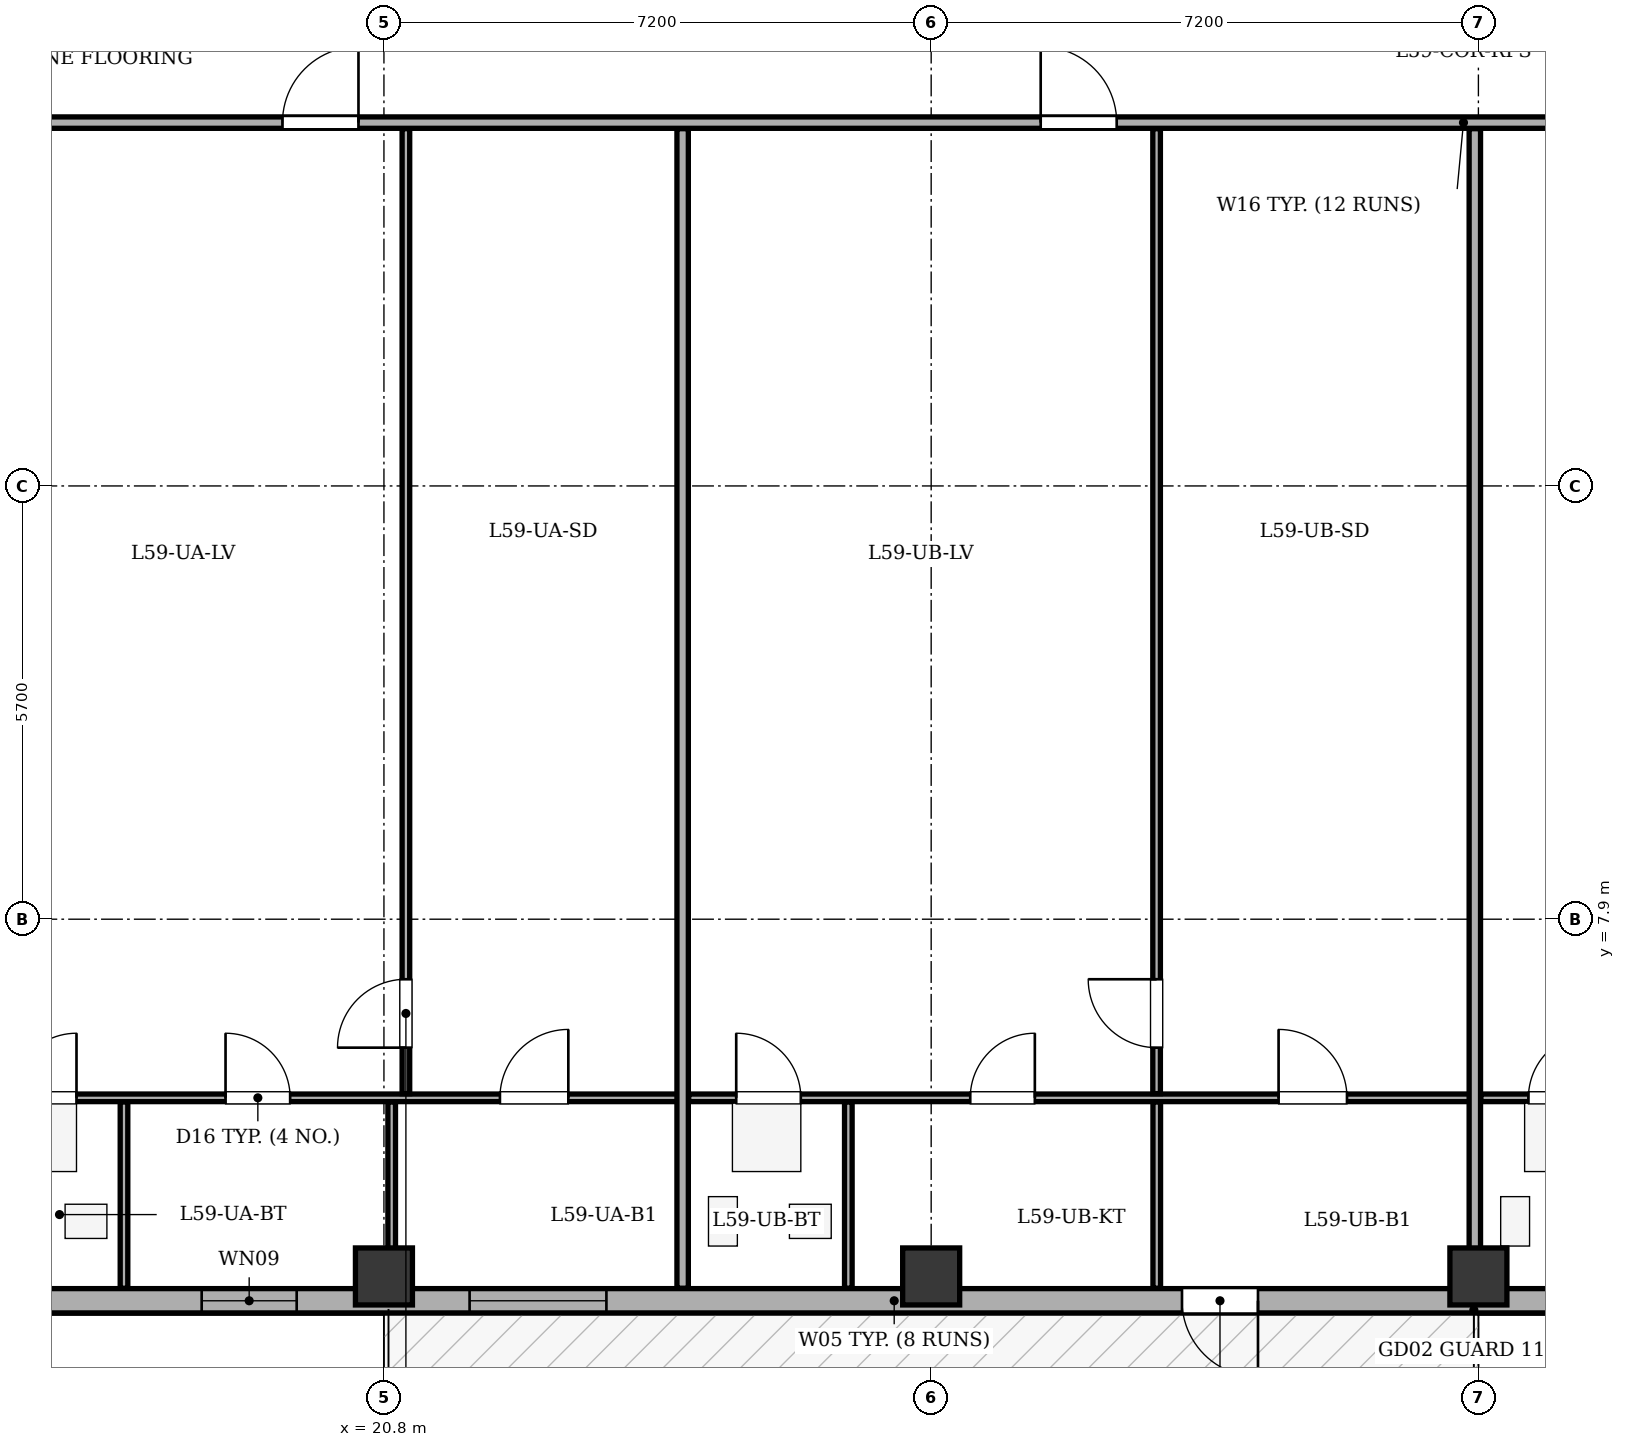
"""IFC4 building model, lengths in metres.
Left out: names, types, materials, properties, quantities, classifications, styles, units other than length and angle.
Written with IfcOpenShell. Run it as: python <this file> out.ifc"""

import sys

from ifc_helpers import new_model, si_unit, direction, frame, frame_2d, origin, origin_2d, place, context, subcontext, project, spatial, rectangle, extrude, element, fill, save


model = new_model("IFC4")
c1 = context("Model", 3, precision=1e-05, world=origin(), true_north=direction((0.0, 1.0)))
c2 = subcontext(c1, "Body", "Model", "MODEL_VIEW")
j1 = project(units=[si_unit("LENGTHUNIT", "METRE"), si_unit("PLANEANGLEUNIT", "RADIAN")], contexts=[c1])
p1 = place(None, origin())
s1 = spatial("IfcSite", under=j1, at=p1, CompositionType="ELEMENT")
p2 = place(p1, origin())
s2 = spatial("IfcBuilding", under=s1, at=p2, CompositionType="ELEMENT")
p3 = place(p2, frame((0.0, 0.0, 227.9)))
s3 = spatial("IfcBuildingStorey", under=s2, at=p3, CompositionType="ELEMENT", Elevation=227.9)
for number, where, z_axis, x_axis in (
    (1, (20.8, 3.2, 0.0), (0.0, 0.0, 1.0), (1.0, 0.0, 0.0)),
    (2, (28.0, 3.2, 0.0), (0.0, 0.0, 1.0), (1.0, 0.0, 0.0)),
    (3, (35.2, 3.2, 0.0), (0.0, 0.0, 1.0), (1.0, 0.0, 0.0)),
):
    element("IfcColumn", number, at=place(p3, frame(where, z_axis=z_axis, x_axis=x_axis)), inside=s3, PredefinedType="COLUMN", context=c2, shape_type="SweptSolid", body=[
        extrude(rectangle(XDim=0.75, YDim=0.75, at=origin_2d()), origin(), (0.0, 0.0, 1.0), 3.4),
    ])
p4 = place(p3, frame((51.2, 2.88, 0.0), z_axis=(0.0, 0.0, 1.0), x_axis=(-1.0, 0.0, 0.0)))
e4 = element("IfcWall", 4, at=p4, inside=s3, PredefinedType="STANDARD", context=c2, shape_type="SweptSolid", body=[
    extrude(rectangle(XDim=36.0, YDim=0.32, at=frame_2d((18.0, 0.0))), origin(), (0.0, 0.0, 1.0), 2.725),
])
p5 = place(p4, frame((18.9, 0.0, 0.0)))
e5 = element("IfcOpeningElement", 5, at=p5, cuts=e4, PredefinedType="OPENING", context=c2, shape_type="SweptSolid", body=[
    extrude(rectangle(XDim=1.0, YDim=2.02, at=frame_2d((0.5, 1.01))), frame((0.0, 0.17, 0.0), z_axis=(0.0, -1.0, 0.0), x_axis=(1.0, 0.0, 0.0)), (0.0, 0.0, 1.0), 0.34),
])
p6 = place(p4, frame((2.31, 0.0, 0.75)))
e6 = element("IfcOpeningElement", 6, at=p6, cuts=e4, PredefinedType="OPENING", context=c2, shape_type="SweptSolid", body=[
    extrude(rectangle(XDim=1.8, YDim=1.7, at=frame_2d((0.9, 0.85))), frame((0.0, 0.17, 0.0), z_axis=(0.0, -1.0, 0.0), x_axis=(1.0, 0.0, 0.0)), (0.0, 0.0, 1.0), 0.34),
])
p7 = place(p4, frame((7.294, 0.0, 0.75)))
e7 = element("IfcOpeningElement", 7, at=p7, cuts=e4, PredefinedType="OPENING", context=c2, shape_type="SweptSolid", body=[
    extrude(rectangle(XDim=1.8, YDim=1.7, at=frame_2d((0.9, 0.85))), frame((0.0, 0.17, 0.0), z_axis=(0.0, -1.0, 0.0), x_axis=(1.0, 0.0, 0.0)), (0.0, 0.0, 1.0), 0.34),
])
p8 = place(p4, frame((11.117, 0.0, 0.75)))
e8 = element("IfcOpeningElement", 8, at=p8, cuts=e4, PredefinedType="OPENING", context=c2, shape_type="SweptSolid", body=[
    extrude(rectangle(XDim=1.8, YDim=1.7, at=frame_2d((0.9, 0.85))), frame((0.0, 0.17, 0.0), z_axis=(0.0, -1.0, 0.0), x_axis=(1.0, 0.0, 0.0)), (0.0, 0.0, 1.0), 0.34),
])
p9 = place(p4, frame((27.473, 0.0, 0.75)))
e9 = element("IfcOpeningElement", 9, at=p9, cuts=e4, PredefinedType="OPENING", context=c2, shape_type="SweptSolid", body=[
    extrude(rectangle(XDim=1.8, YDim=1.7, at=frame_2d((0.9, 0.85))), frame((0.0, 0.17, 0.0), z_axis=(0.0, -1.0, 0.0), x_axis=(1.0, 0.0, 0.0)), (0.0, 0.0, 1.0), 0.34),
])
p10 = place(p4, frame((31.548, 0.0, 0.75)))
e10 = element("IfcOpeningElement", 10, at=p10, cuts=e4, PredefinedType="OPENING", context=c2, shape_type="SweptSolid", body=[
    extrude(rectangle(XDim=1.25, YDim=1.7, at=frame_2d((0.625, 0.85))), frame((0.0, 0.17, 0.0), z_axis=(0.0, -1.0, 0.0), x_axis=(1.0, 0.0, 0.0)), (0.0, 0.0, 1.0), 0.34),
])
p11 = place(p3, frame((15.08, 18.38, 0.0), z_axis=(0.0, 0.0, 1.0), x_axis=(1.0, 0.0, 0.0)))
e11 = element("IfcWall", 11, at=p11, inside=s3, PredefinedType="PARTITIONING", context=c2, shape_type="SweptSolid", body=[
    extrude(rectangle(XDim=30.02, YDim=0.15, at=frame_2d((15.01, 0.0))), origin(), (0.0, 0.0, 1.0), 3.1),
])
p12 = place(p11, frame((4.385, 0.0, 0.0)))
e12 = element("IfcOpeningElement", 12, at=p12, cuts=e11, PredefinedType="OPENING", context=c2, shape_type="SweptSolid", body=[
    extrude(rectangle(XDim=1.0, YDim=2.1, at=frame_2d((0.5, 1.05))), frame((0.0, 0.085, 0.0), z_axis=(0.0, -1.0, 0.0), x_axis=(1.0, 0.0, 0.0)), (0.0, 0.0, 1.0), 0.17),
])
p13 = place(p11, frame((14.361, 0.0, 0.0)))
e13 = element("IfcOpeningElement", 13, at=p13, cuts=e11, PredefinedType="OPENING", context=c2, shape_type="SweptSolid", body=[
    extrude(rectangle(XDim=1.0, YDim=2.1, at=frame_2d((0.5, 1.05))), frame((0.0, 0.085, 0.0), z_axis=(0.0, -1.0, 0.0), x_axis=(1.0, 0.0, 0.0)), (0.0, 0.0, 1.0), 0.17),
])
p14 = place(p11, frame((24.486, 0.0, 0.0)))
e14 = element("IfcOpeningElement", 14, at=p14, cuts=e11, PredefinedType="OPENING", context=c2, shape_type="SweptSolid", body=[
    extrude(rectangle(XDim=1.0, YDim=2.1, at=frame_2d((0.5, 1.05))), frame((0.0, 0.085, 0.0), z_axis=(0.0, -1.0, 0.0), x_axis=(1.0, 0.0, 0.0)), (0.0, 0.0, 1.0), 0.17),
])
p15 = place(p3, frame((15.28, 5.55, 0.0), z_axis=(0.0, 0.0, 1.0), x_axis=(1.0, 0.0, 0.0)))
e15 = element("IfcWall", 15, at=p15, inside=s3, PredefinedType="PARTITIONING", context=c2, shape_type="SweptSolid", body=[
    extrude(rectangle(XDim=9.49, YDim=0.1, at=frame_2d((4.745, 0.0))), origin(), (0.0, 0.0, 1.0), 3.1),
])
p16 = place(p15, frame((0.625, 0.0, 0.0)))
e16 = element("IfcOpeningElement", 16, at=p16, cuts=e15, PredefinedType="OPENING", context=c2, shape_type="SweptSolid", body=[
    extrude(rectangle(XDim=0.85, YDim=2.05, at=frame_2d((0.425, 1.025))), frame((0.0, 0.06, 0.0), z_axis=(0.0, -1.0, 0.0), x_axis=(1.0, 0.0, 0.0)), (0.0, 0.0, 1.0), 0.12),
])
p17 = place(p15, frame((3.436, 0.0, 0.0)))
e17 = element("IfcOpeningElement", 17, at=p17, cuts=e15, PredefinedType="OPENING", context=c2, shape_type="SweptSolid", body=[
    extrude(rectangle(XDim=0.85, YDim=2.05, at=frame_2d((0.425, 1.025))), frame((0.0, 0.06, 0.0), z_axis=(0.0, -1.0, 0.0), x_axis=(1.0, 0.0, 0.0)), (0.0, 0.0, 1.0), 0.12),
])
p18 = place(p15, frame((7.046, 0.0, 0.0)))
e18 = element("IfcOpeningElement", 18, at=p18, cuts=e15, PredefinedType="OPENING", context=c2, shape_type="SweptSolid", body=[
    extrude(rectangle(XDim=0.9, YDim=2.05, at=frame_2d((0.45, 1.025))), frame((0.0, 0.06, 0.0), z_axis=(0.0, -1.0, 0.0), x_axis=(1.0, 0.0, 0.0)), (0.0, 0.0, 1.0), 0.12),
])
p19 = place(p3, frame((21.089, 5.605, 0.0), z_axis=(0.0, 0.0, 1.0), x_axis=(0.0, 1.0, 0.0)))
e19 = element("IfcWall", 19, at=p19, inside=s3, PredefinedType="PARTITIONING", context=c2, shape_type="SweptSolid", body=[
    extrude(rectangle(XDim=12.695, YDim=0.1, at=frame_2d((6.348, 0.0))), origin(), (0.0, 0.0, 1.0), 2.535),
])
p20 = place(p19, frame((0.605, 0.0, 0.0)))
e20 = element("IfcOpeningElement", 20, at=p20, cuts=e19, PredefinedType="OPENING", context=c2, shape_type="SweptSolid", body=[
    extrude(rectangle(XDim=0.9, YDim=2.05, at=frame_2d((0.45, 1.025))), frame((0.0, 0.06, 0.0), z_axis=(0.0, -1.0, 0.0), x_axis=(1.0, 0.0, 0.0)), (0.0, 0.0, 1.0), 0.12),
])
p21 = place(p3, frame((17.38, 3.045, 0.0), z_axis=(0.0, 0.0, 1.0), x_axis=(0.0, 1.0, 0.0)))
e21 = element("IfcWall", 21, at=p21, inside=s3, PredefinedType="PARTITIONING", context=c2, shape_type="SweptSolid", body=[
    extrude(rectangle(XDim=2.45, YDim=0.1, at=frame_2d((1.225, 0.0))), origin(), (0.0, 0.0, 1.0), 3.1),
])
p22 = place(p3, frame((20.902, 3.045, 0.0), z_axis=(0.0, 0.0, 1.0), x_axis=(0.0, 1.0, 0.0)))
e22 = element("IfcWall", 22, at=p22, inside=s3, PredefinedType="PARTITIONING", context=c2, shape_type="SweptSolid", body=[
    extrude(rectangle(XDim=2.45, YDim=0.1, at=frame_2d((1.225, 0.0))), origin(), (0.0, 0.0, 1.0), 2.535),
])
p23 = place(p3, frame((24.73, 3.045, 0.0), z_axis=(0.0, 0.0, 1.0), x_axis=(0.0, 1.0, 0.0)))
e23 = element("IfcWall", 23, at=p23, inside=s3, PredefinedType="PARTITIONING", context=c2, shape_type="SweptSolid", body=[
    extrude(rectangle(XDim=15.255, YDim=0.15, at=frame_2d((7.627, 0.0))), origin(), (0.0, 0.0, 1.0), 3.1),
])
p24 = place(p3, frame((24.81, 5.55, 0.0), z_axis=(0.0, 0.0, 1.0), x_axis=(1.0, 0.0, 0.0)))
e24 = element("IfcWall", 24, at=p24, inside=s3, PredefinedType="PARTITIONING", context=c2, shape_type="SweptSolid", body=[
    extrude(rectangle(XDim=10.383, YDim=0.1, at=frame_2d((5.191, 0.0))), origin(), (0.0, 0.0, 1.0), 3.1),
])
p25 = place(p24, frame((0.625, 0.0, 0.0)))
e25 = element("IfcOpeningElement", 25, at=p25, cuts=e24, PredefinedType="OPENING", context=c2, shape_type="SweptSolid", body=[
    extrude(rectangle(XDim=0.85, YDim=2.05, at=frame_2d((0.425, 1.025))), frame((0.0, 0.06, 0.0), z_axis=(0.0, -1.0, 0.0), x_axis=(1.0, 0.0, 0.0)), (0.0, 0.0, 1.0), 0.12),
])
p26 = place(p24, frame((3.704, 0.0, 0.0)))
e26 = element("IfcOpeningElement", 26, at=p26, cuts=e24, PredefinedType="OPENING", context=c2, shape_type="SweptSolid", body=[
    extrude(rectangle(XDim=0.85, YDim=2.05, at=frame_2d((0.425, 1.025))), frame((0.0, 0.06, 0.0), z_axis=(0.0, -1.0, 0.0), x_axis=(1.0, 0.0, 0.0)), (0.0, 0.0, 1.0), 0.12),
])
p27 = place(p24, frame((7.761, 0.0, 0.0)))
e27 = element("IfcOpeningElement", 27, at=p27, cuts=e24, PredefinedType="OPENING", context=c2, shape_type="SweptSolid", body=[
    extrude(rectangle(XDim=0.9, YDim=2.05, at=frame_2d((0.45, 1.025))), frame((0.0, 0.06, 0.0), z_axis=(0.0, -1.0, 0.0), x_axis=(1.0, 0.0, 0.0)), (0.0, 0.0, 1.0), 0.12),
])
p28 = place(p3, frame((30.966, 5.605, 0.0), z_axis=(0.0, 0.0, 1.0), x_axis=(0.0, 1.0, 0.0)))
e28 = element("IfcWall", 28, at=p28, inside=s3, PredefinedType="PARTITIONING", context=c2, shape_type="SweptSolid", body=[
    extrude(rectangle(XDim=12.695, YDim=0.1, at=frame_2d((6.348, 0.0))), origin(), (0.0, 0.0, 1.0), 3.1),
])
p29 = place(p28, frame((0.605, 0.0, 0.0)))
e29 = element("IfcOpeningElement", 29, at=p29, cuts=e28, PredefinedType="OPENING", context=c2, shape_type="SweptSolid", body=[
    extrude(rectangle(XDim=0.9, YDim=2.05, at=frame_2d((0.45, 1.025))), frame((0.0, 0.06, 0.0), z_axis=(0.0, -1.0, 0.0), x_axis=(1.0, 0.0, 0.0)), (0.0, 0.0, 1.0), 0.12),
])
for number, where, z_axis, x_axis in (
    (30, (26.91, 3.045, 0.0), (0.0, 0.0, 1.0), (0.0, 1.0, 0.0)),
    (31, (30.968, 3.045, 0.0), (0.0, 0.0, 1.0), (0.0, 1.0, 0.0)),
):
    element("IfcWall", number, at=place(p3, frame(where, z_axis=z_axis, x_axis=x_axis)), inside=s3, PredefinedType="PARTITIONING", context=c2, shape_type="SweptSolid", body=[
        extrude(rectangle(XDim=2.45, YDim=0.1, at=frame_2d((1.225, 0.0))), origin(), (0.0, 0.0, 1.0), 3.1),
    ])
p30 = place(p3, frame((35.153, 3.045, 0.0), z_axis=(0.0, 0.0, 1.0), x_axis=(0.0, 1.0, 0.0)))
e32 = element("IfcWall", 32, at=p30, inside=s3, PredefinedType="PARTITIONING", context=c2, shape_type="SweptSolid", body=[
    extrude(rectangle(XDim=15.255, YDim=0.15, at=frame_2d((7.627, 0.0))), origin(), (0.0, 0.0, 1.0), 2.535),
])
p31 = place(p3, frame((35.233, 5.55, 0.0), z_axis=(0.0, 0.0, 1.0), x_axis=(1.0, 0.0, 0.0)))
e33 = element("IfcWall", 33, at=p31, inside=s3, PredefinedType="PARTITIONING", context=c2, shape_type="SweptSolid", body=[
    extrude(rectangle(XDim=9.787, YDim=0.1, at=frame_2d((4.894, 0.0))), origin(), (0.0, 0.0, 1.0), 3.1),
])
p32 = place(p31, frame((0.625, 0.0, 0.0)))
e34 = element("IfcOpeningElement", 34, at=p32, cuts=e33, PredefinedType="OPENING", context=c2, shape_type="SweptSolid", body=[
    extrude(rectangle(XDim=0.85, YDim=2.05, at=frame_2d((0.425, 1.025))), frame((0.0, 0.06, 0.0), z_axis=(0.0, -1.0, 0.0), x_axis=(1.0, 0.0, 0.0)), (0.0, 0.0, 1.0), 0.12),
])
p33 = place(p31, frame((3.525, 0.0, 0.0)))
e35 = element("IfcOpeningElement", 35, at=p33, cuts=e33, PredefinedType="OPENING", context=c2, shape_type="SweptSolid", body=[
    extrude(rectangle(XDim=0.85, YDim=2.05, at=frame_2d((0.425, 1.025))), frame((0.0, 0.06, 0.0), z_axis=(0.0, -1.0, 0.0), x_axis=(1.0, 0.0, 0.0)), (0.0, 0.0, 1.0), 0.12),
])
p34 = place(p31, frame((7.284, 0.0, 0.0)))
e36 = element("IfcOpeningElement", 36, at=p34, cuts=e33, PredefinedType="OPENING", context=c2, shape_type="SweptSolid", body=[
    extrude(rectangle(XDim=0.9, YDim=2.05, at=frame_2d((0.45, 1.025))), frame((0.0, 0.06, 0.0), z_axis=(0.0, -1.0, 0.0), x_axis=(1.0, 0.0, 0.0)), (0.0, 0.0, 1.0), 0.12),
])
p35 = place(p5, origin())
e37 = element("IfcDoor", 37, at=p35, inside=s3, OperationType="SINGLE_SWING_LEFT", PredefinedType="DOOR", context=c2, shape_type="SweptSolid", body=[
    extrude(rectangle(XDim=1.0, YDim=2.02, at=frame_2d((0.5, 1.01))), frame((0.0, 0.025, 0.0), z_axis=(0.0, -1.0, 0.0), x_axis=(1.0, 0.0, 0.0)), (0.0, 0.0, 1.0), 0.05),
])
fill(e5, e37)
p36 = place(p9, origin())
e38 = element("IfcWindow", 38, at=p36, inside=s3, PartitioningType="SINGLE_PANEL", PredefinedType="WINDOW", context=c2, shape_type="SweptSolid", body=[
    extrude(rectangle(XDim=1.8, YDim=1.7, at=frame_2d((0.9, 0.85))), frame((0.0, -0.01, 0.0), z_axis=(0.0, -1.0, 0.0), x_axis=(1.0, 0.0, 0.0)), (0.0, 0.0, 1.0), 0.06),
])
fill(e9, e38)
p37 = place(p10, origin())
e39 = element("IfcWindow", 39, at=p37, inside=s3, PartitioningType="SINGLE_PANEL", PredefinedType="WINDOW", context=c2, shape_type="SweptSolid", body=[
    extrude(rectangle(XDim=1.25, YDim=1.7, at=frame_2d((0.625, 0.85))), frame((0.0, -0.01, 0.0), z_axis=(0.0, -1.0, 0.0), x_axis=(1.0, 0.0, 0.0)), (0.0, 0.0, 1.0), 0.06),
])
fill(e10, e39)
p38 = place(p12, origin())
e40 = element("IfcDoor", 40, at=p38, inside=s3, OperationType="SINGLE_SWING_RIGHT", PredefinedType="DOOR", context=c2, shape_type="SweptSolid", body=[
    extrude(rectangle(XDim=1.0, YDim=2.1, at=frame_2d((0.5, 1.05))), frame((0.0, 0.025, 0.0), z_axis=(0.0, -1.0, 0.0), x_axis=(1.0, 0.0, 0.0)), (0.0, 0.0, 1.0), 0.05),
])
fill(e12, e40)
p39 = place(p13, origin())
e41 = element("IfcDoor", 41, at=p39, inside=s3, OperationType="SINGLE_SWING_LEFT", PredefinedType="DOOR", context=c2, shape_type="SweptSolid", body=[
    extrude(rectangle(XDim=1.0, YDim=2.1, at=frame_2d((0.5, 1.05))), frame((0.0, 0.025, 0.0), z_axis=(0.0, -1.0, 0.0), x_axis=(1.0, 0.0, 0.0)), (0.0, 0.0, 1.0), 0.05),
])
fill(e13, e41)
p40 = place(p20, origin())
e42 = element("IfcDoor", 42, at=p40, inside=s3, OperationType="SINGLE_SWING_LEFT", PredefinedType="DOOR", context=c2, shape_type="SweptSolid", body=[
    extrude(rectangle(XDim=0.9, YDim=2.05, at=frame_2d((0.45, 1.025))), frame((0.0, 0.025, 0.0), z_axis=(0.0, -1.0, 0.0), x_axis=(1.0, 0.0, 0.0)), (0.0, 0.0, 1.0), 0.05),
])
fill(e20, e42)
p41 = place(p16, origin())
e43 = element("IfcDoor", 43, at=p41, inside=s3, OperationType="SINGLE_SWING_RIGHT", PredefinedType="DOOR", context=c2, shape_type="SweptSolid", body=[
    extrude(rectangle(XDim=0.85, YDim=2.05, at=frame_2d((0.425, 1.025))), frame((0.0, 0.025, 0.0), z_axis=(0.0, -1.0, 0.0), x_axis=(1.0, 0.0, 0.0)), (0.0, 0.0, 1.0), 0.05),
])
fill(e16, e43)
p42 = place(p17, origin())
e44 = element("IfcDoor", 44, at=p42, inside=s3, OperationType="SINGLE_SWING_LEFT", PredefinedType="DOOR", context=c2, shape_type="SweptSolid", body=[
    extrude(rectangle(XDim=0.85, YDim=2.05, at=frame_2d((0.425, 1.025))), frame((0.0, 0.025, 0.0), z_axis=(0.0, -1.0, 0.0), x_axis=(1.0, 0.0, 0.0)), (0.0, 0.0, 1.0), 0.05),
])
fill(e17, e44)
p43 = place(p18, origin())
e45 = element("IfcDoor", 45, at=p43, inside=s3, OperationType="SINGLE_SWING_RIGHT", PredefinedType="DOOR", context=c2, shape_type="SweptSolid", body=[
    extrude(rectangle(XDim=0.9, YDim=2.05, at=frame_2d((0.45, 1.025))), frame((0.0, 0.025, 0.0), z_axis=(0.0, -1.0, 0.0), x_axis=(1.0, 0.0, 0.0)), (0.0, 0.0, 1.0), 0.05),
])
fill(e18, e45)
p44 = place(p29, origin())
e46 = element("IfcDoor", 46, at=p44, inside=s3, OperationType="SINGLE_SWING_RIGHT", PredefinedType="DOOR", context=c2, shape_type="SweptSolid", body=[
    extrude(rectangle(XDim=0.9, YDim=2.05, at=frame_2d((0.45, 1.025))), frame((0.0, 0.025, 0.0), z_axis=(0.0, -1.0, 0.0), x_axis=(1.0, 0.0, 0.0)), (0.0, 0.0, 1.0), 0.05),
])
fill(e29, e46)
p45 = place(p25, origin())
e47 = element("IfcDoor", 47, at=p45, inside=s3, OperationType="SINGLE_SWING_LEFT", PredefinedType="DOOR", context=c2, shape_type="SweptSolid", body=[
    extrude(rectangle(XDim=0.85, YDim=2.05, at=frame_2d((0.425, 1.025))), frame((0.0, 0.025, 0.0), z_axis=(0.0, -1.0, 0.0), x_axis=(1.0, 0.0, 0.0)), (0.0, 0.0, 1.0), 0.05),
])
fill(e25, e47)
p46 = place(p26, origin())
e48 = element("IfcDoor", 48, at=p46, inside=s3, OperationType="SINGLE_SWING_RIGHT", PredefinedType="DOOR", context=c2, shape_type="SweptSolid", body=[
    extrude(rectangle(XDim=0.85, YDim=2.05, at=frame_2d((0.425, 1.025))), frame((0.0, 0.025, 0.0), z_axis=(0.0, -1.0, 0.0), x_axis=(1.0, 0.0, 0.0)), (0.0, 0.0, 1.0), 0.05),
])
fill(e26, e48)
p47 = place(p27, origin())
e49 = element("IfcDoor", 49, at=p47, inside=s3, OperationType="SINGLE_SWING_LEFT", PredefinedType="DOOR", context=c2, shape_type="SweptSolid", body=[
    extrude(rectangle(XDim=0.9, YDim=2.05, at=frame_2d((0.45, 1.025))), frame((0.0, 0.025, 0.0), z_axis=(0.0, -1.0, 0.0), x_axis=(1.0, 0.0, 0.0)), (0.0, 0.0, 1.0), 0.05),
])
fill(e27, e49)
p48 = place(p32, origin())
e50 = element("IfcDoor", 50, at=p48, inside=s3, OperationType="SINGLE_SWING_RIGHT", PredefinedType="DOOR", context=c2, shape_type="SweptSolid", body=[
    extrude(rectangle(XDim=0.85, YDim=2.05, at=frame_2d((0.425, 1.025))), frame((0.0, 0.025, 0.0), z_axis=(0.0, -1.0, 0.0), x_axis=(1.0, 0.0, 0.0)), (0.0, 0.0, 1.0), 0.05),
])
fill(e34, e50)
save(model, sys.argv[1])
